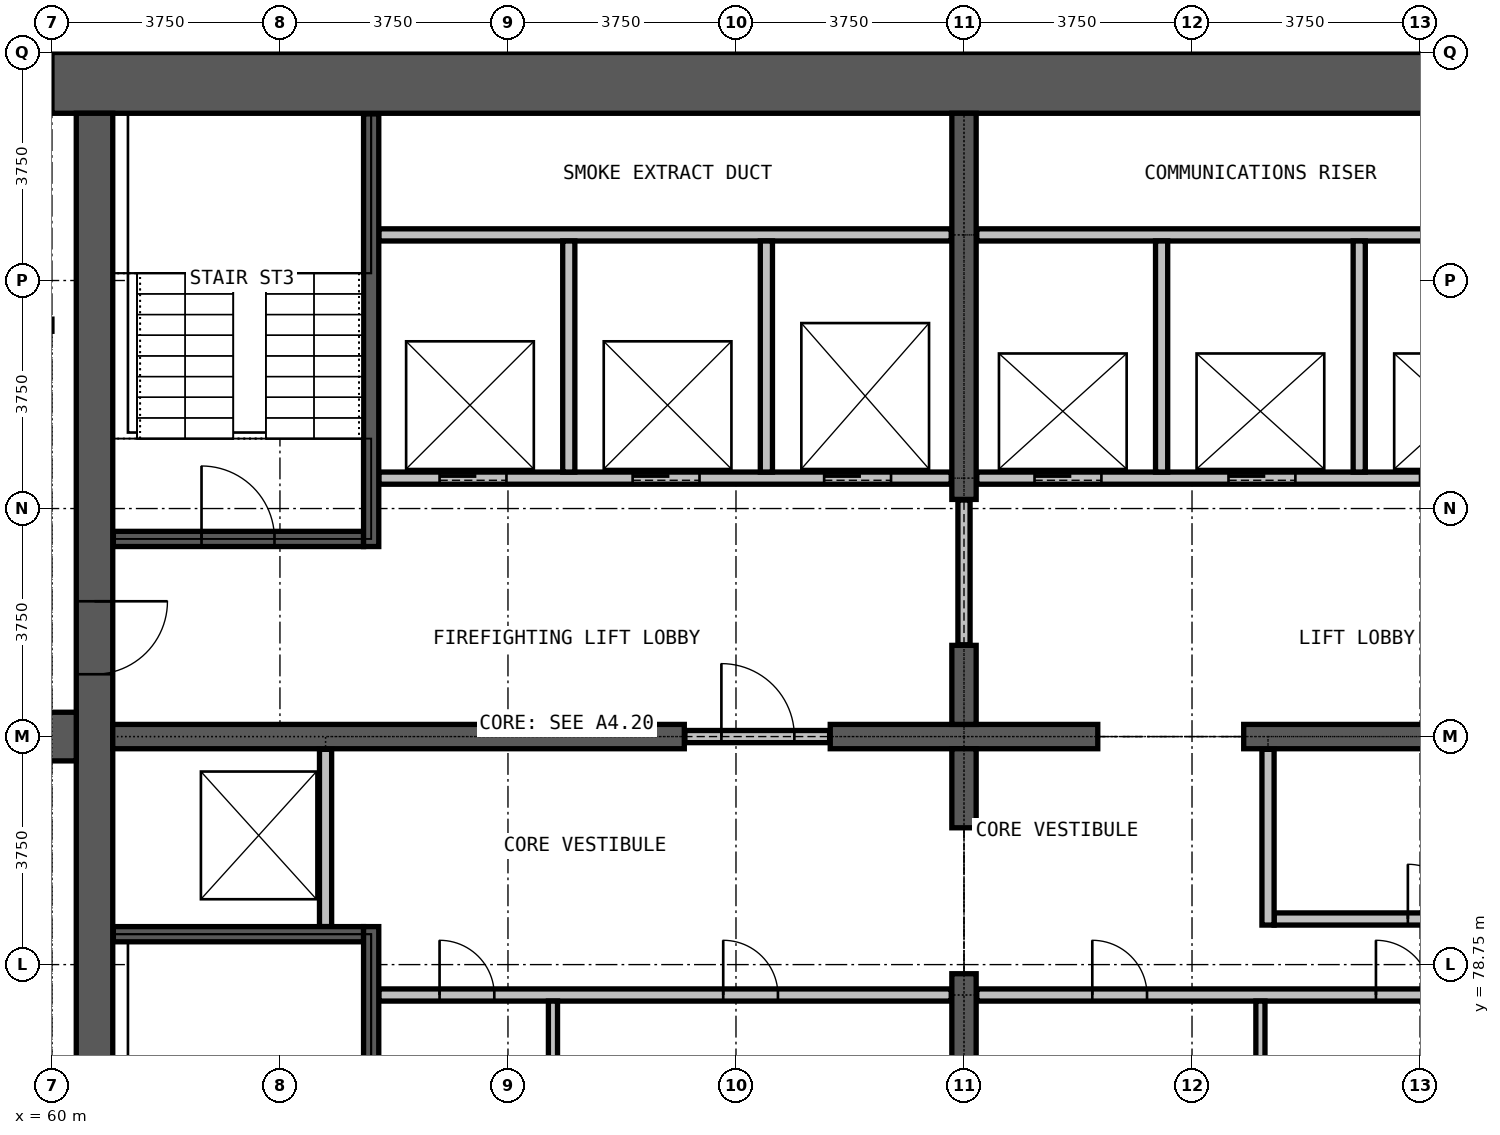
"""IFC4 building model, lengths in metres.
Left out: names, types, materials, properties, quantities, classifications, styles, units other than length and angle.
Written with IfcOpenShell. Run it as: python <this file> out.ifc"""

import sys

from ifc_helpers import new_model, si_unit, direction, frame, frame_2d, origin, place, context, subcontext, project, spatial, rectangle, extrude, element, fill, save


model = new_model("IFC4")
c1 = context("Model", 3, precision=1e-05, world=origin(), true_north=direction((0.0, 1.0)))
c2 = subcontext(c1, "Body", "Model", "MODEL_VIEW")
j1 = project(units=[si_unit("LENGTHUNIT", "METRE"), si_unit("PLANEANGLEUNIT", "RADIAN")], contexts=[c1])
p1 = place(None, origin())
s1 = spatial("IfcSite", under=j1, at=p1, CompositionType="ELEMENT")
p2 = place(p1, origin())
s2 = spatial("IfcBuilding", under=s1, at=p2, CompositionType="ELEMENT")
p3 = place(p2, frame((0.0, 0.0, 183.7)))
s3 = spatial("IfcBuildingStorey", under=s2, at=p3, CompositionType="ELEMENT", Elevation=183.7)
p4 = place(p3, frame((90.0, 93.25, 0.0), z_axis=(0.0, 0.0, 1.0), x_axis=(-1.0, 0.0, 0.0)))
e1 = element("IfcWall", 1, at=p4, inside=s3, PredefinedType="SHEAR", context=c2, shape_type="SweptSolid", body=[
    extrude(rectangle(XDim=30.0, YDim=1.0, at=frame_2d((15.0, 0.0))), origin(), (0.0, 0.0, 1.0), 5.0),
])
p5 = place(p3, frame((60.7, 92.75, 0.0), z_axis=(0.0, 0.0, 1.0), x_axis=(0.0, -1.0, 0.0)))
e2 = element("IfcWall", 2, at=p5, inside=s3, PredefinedType="SHEAR", context=c2, shape_type="SweptSolid", body=[
    extrude(rectangle(XDim=20.5, YDim=0.6, at=frame_2d((10.25, 0.0))), origin(), (0.0, 0.0, 1.0), 5.0),
])
p6 = place(p5, frame((19.025, 0.0, 0.0)))
e3 = element("IfcOpeningElement", 3, at=p6, cuts=e2, PredefinedType="OPENING", context=c2, shape_type="SweptSolid", body=[
    extrude(rectangle(XDim=1.2, YDim=2.2, at=frame_2d((0.6, 1.1))), frame((0.0, 0.31, 0.0), z_axis=(0.0, -1.0, 0.0), x_axis=(1.0, 0.0, 0.0)), (0.0, 0.0, 1.0), 0.62),
])
p7 = place(p5, frame((8.025, 0.0, 0.0)))
e4 = element("IfcOpeningElement", 4, at=p7, cuts=e2, PredefinedType="OPENING", context=c2, shape_type="SweptSolid", body=[
    extrude(rectangle(XDim=1.2, YDim=2.2, at=frame_2d((0.6, 1.1))), frame((0.0, 0.31, 0.0), z_axis=(0.0, -1.0, 0.0), x_axis=(1.0, 0.0, 0.0)), (0.0, 0.0, 1.0), 0.62),
])
p8 = place(p3, frame((61.0, 82.5, 0.0), z_axis=(0.0, 0.0, 1.0), x_axis=(1.0, 0.0, 0.0)))
e5 = element("IfcWall", 5, at=p8, inside=s3, PredefinedType="SHEAR", context=c2, shape_type="SweptSolid", body=[
    extrude(rectangle(XDim=9.4, YDim=0.4, at=frame_2d((4.7, 0.0))), origin(), (0.0, 0.0, 1.0), 5.0),
])
p9 = place(p3, frame((72.8, 82.5, 0.0), z_axis=(0.0, 0.0, 1.0), x_axis=(1.0, 0.0, 0.0)))
e6 = element("IfcWall", 6, at=p9, inside=s3, PredefinedType="SHEAR", context=c2, shape_type="SweptSolid", body=[
    extrude(rectangle(XDim=4.4, YDim=0.4, at=frame_2d((2.2, 0.0))), origin(), (0.0, 0.0, 1.0), 5.0),
])
p10 = place(p3, frame((79.6, 82.5, 0.0), z_axis=(0.0, 0.0, 1.0), x_axis=(1.0, 0.0, 0.0)))
e7 = element("IfcWall", 7, at=p10, inside=s3, PredefinedType="SHEAR", context=c2, shape_type="SweptSolid", body=[
    extrude(rectangle(XDim=9.4, YDim=0.4, at=frame_2d((4.7, 0.0))), origin(), (0.0, 0.0, 1.0), 5.0),
])
p11 = place(p3, frame((75.0, 72.25, 0.0), z_axis=(0.0, 0.0, 1.0), x_axis=(0.0, 1.0, 0.0)))
e8 = element("IfcWall", 8, at=p11, inside=s3, PredefinedType="SHEAR", context=c2, shape_type="SweptSolid", body=[
    extrude(rectangle(XDim=6.35, YDim=0.4, at=frame_2d((3.175, 0.0))), origin(), (0.0, 0.0, 1.0), 5.0),
])
for number, where, z_axis, x_axis in (
    (9, (75.0, 81.0, 0.0), (0.0, 0.0, 1.0), (0.0, 1.0, 0.0)),
    (10, (75.0, 82.7, 0.0), (0.0, 0.0, 1.0), (0.0, 1.0, 0.0)),
):
    element("IfcWall", number, at=place(p3, frame(where, z_axis=z_axis, x_axis=x_axis)), inside=s3, PredefinedType="SHEAR", context=c2, shape_type="SweptSolid", body=[
        extrude(rectangle(XDim=1.3, YDim=0.4, at=frame_2d((0.65, 0.0))), origin(), (0.0, 0.0, 1.0), 5.0),
    ])
p12 = place(p3, frame((75.0, 86.4, 0.0), z_axis=(0.0, 0.0, 1.0), x_axis=(0.0, 1.0, 0.0)))
e11 = element("IfcWall", 11, at=p12, inside=s3, PredefinedType="SHEAR", context=c2, shape_type="SweptSolid", body=[
    extrude(rectangle(XDim=6.35, YDim=0.4, at=frame_2d((3.175, 0.0))), origin(), (0.0, 0.0, 1.0), 5.0),
])
p13 = place(p3, frame((57.9, 82.5, 0.0), z_axis=(0.0, 0.0, 1.0), x_axis=(1.0, 0.0, 0.0)))
e12 = element("IfcWall", 12, at=p13, inside=s3, PredefinedType="SHEAR", context=c2, shape_type="SweptSolid", body=[
    extrude(rectangle(XDim=2.5, YDim=0.8, at=frame_2d((1.25, 0.0))), origin(), (0.0, 0.0, 1.0), 4.7),
])
p14 = place(p3, frame((65.375, 78.25, 0.0), z_axis=(0.0, 0.0, 1.0), x_axis=(1.0, 0.0, 0.0)))
e13 = element("IfcWall", 13, at=p14, inside=s3, PredefinedType="PARTITIONING", context=c2, shape_type="SweptSolid", body=[
    extrude(rectangle(XDim=9.415, YDim=0.2, at=frame_2d((4.708, 0.0))), origin(), (0.0, 0.0, 1.0), 4.7),
])
p15 = place(p14, frame((1.0, 0.0, 0.0)))
e14 = element("IfcOpeningElement", 14, at=p15, cuts=e13, PredefinedType="OPENING", context=c2, shape_type="SweptSolid", body=[
    extrude(rectangle(XDim=0.9, YDim=2.2, at=frame_2d((0.45, 1.1))), frame((0.0, 0.11, 0.0), z_axis=(0.0, -1.0, 0.0), x_axis=(1.0, 0.0, 0.0)), (0.0, 0.0, 1.0), 0.22),
])
p16 = place(p14, frame((5.665, 0.0, 0.0)))
e15 = element("IfcOpeningElement", 15, at=p16, cuts=e13, PredefinedType="OPENING", context=c2, shape_type="SweptSolid", body=[
    extrude(rectangle(XDim=0.9, YDim=2.2, at=frame_2d((0.45, 1.1))), frame((0.0, 0.11, 0.0), z_axis=(0.0, -1.0, 0.0), x_axis=(1.0, 0.0, 0.0)), (0.0, 0.0, 1.0), 0.22),
])
p17 = place(p3, frame((75.21, 78.25, 0.0), z_axis=(0.0, 0.0, 1.0), x_axis=(1.0, 0.0, 0.0)))
e16 = element("IfcWall", 16, at=p17, inside=s3, PredefinedType="PARTITIONING", context=c2, shape_type="SweptSolid", body=[
    extrude(rectangle(XDim=9.415, YDim=0.2, at=frame_2d((4.708, 0.0))), origin(), (0.0, 0.0, 1.0), 4.7),
])
p18 = place(p17, frame((1.9, 0.0, 0.0)))
e17 = element("IfcOpeningElement", 17, at=p18, cuts=e16, PredefinedType="OPENING", context=c2, shape_type="SweptSolid", body=[
    extrude(rectangle(XDim=0.9, YDim=2.2, at=frame_2d((0.45, 1.1))), frame((0.0, 0.11, 0.0), z_axis=(0.0, -1.0, 0.0), x_axis=(1.0, 0.0, 0.0)), (0.0, 0.0, 1.0), 0.22),
])
p19 = place(p17, frame((6.565, 0.0, 0.0)))
e18 = element("IfcOpeningElement", 18, at=p19, cuts=e16, PredefinedType="OPENING", context=c2, shape_type="SweptSolid", body=[
    extrude(rectangle(XDim=0.9, YDim=2.2, at=frame_2d((0.45, 1.1))), frame((0.0, 0.11, 0.0), z_axis=(0.0, -1.0, 0.0), x_axis=(1.0, 0.0, 0.0)), (0.0, 0.0, 1.0), 0.22),
])
p20 = place(p3, frame((80.1, 79.5, 0.0), z_axis=(0.0, 0.0, 1.0), x_axis=(1.0, 0.0, 0.0)))
e19 = element("IfcWall", 19, at=p20, inside=s3, PredefinedType="PARTITIONING", context=c2, shape_type="SweptSolid", body=[
    extrude(rectangle(XDim=5.3, YDim=0.2, at=frame_2d((2.65, 0.0))), origin(), (0.0, 0.0, 1.0), 4.7),
])
p21 = place(p20, frame((2.2, 0.0, 0.0)))
e20 = element("IfcOpeningElement", 20, at=p21, cuts=e19, PredefinedType="OPENING", context=c2, shape_type="SweptSolid", body=[
    extrude(rectangle(XDim=0.9, YDim=2.2, at=frame_2d((0.45, 1.1))), frame((0.0, 0.11, 0.0), z_axis=(0.0, -1.0, 0.0), x_axis=(1.0, 0.0, 0.0)), (0.0, 0.0, 1.0), 0.22),
])
p22 = place(p3, frame((70.41, 82.5, 0.0), z_axis=(0.0, 0.0, 1.0), x_axis=(1.0, 0.0, 0.0)))
e21 = element("IfcWall", 21, at=p22, inside=s3, PredefinedType="PARTITIONING", context=c2, shape_type="SweptSolid", body=[
    extrude(rectangle(XDim=2.38, YDim=0.2, at=frame_2d((1.19, 0.0))), origin(), (0.0, 0.0, 1.0), 2.4),
])
p23 = place(p22, frame((0.6, 0.0, 0.0)))
e22 = element("IfcOpeningElement", 22, at=p23, cuts=e21, PredefinedType="OPENING", context=c2, shape_type="SweptSolid", body=[
    extrude(rectangle(XDim=1.2, YDim=2.2, at=frame_2d((0.6, 1.1))), frame((0.0, 0.11, 0.0), z_axis=(0.0, -1.0, 0.0), x_axis=(1.0, 0.0, 0.0)), (0.0, 0.0, 1.0), 0.22),
])
p24 = place(p3, frame((75.0, 84.01, 0.0), z_axis=(0.0, 0.0, 1.0), x_axis=(0.0, 1.0, 0.0)))
e23 = element("IfcWall", 23, at=p24, inside=s3, PredefinedType="PARTITIONING", context=c2, shape_type="SweptSolid", body=[
    extrude(rectangle(XDim=2.38, YDim=0.2, at=frame_2d((1.19, 0.0))), origin(), (0.0, 0.0, 1.0), 2.4),
])
p25 = place(p3, frame((80.0, 79.4, 0.0), z_axis=(0.0, 0.0, 1.0), x_axis=(0.0, 1.0, 0.0)))
e24 = element("IfcWall", 24, at=p25, inside=s3, PredefinedType="PARTITIONING", context=c2, shape_type="SweptSolid", body=[
    extrude(rectangle(XDim=2.89, YDim=0.2, at=frame_2d((1.445, 0.0))), origin(), (0.0, 0.0, 1.0), 4.7),
])
for number, where, z_axis, x_axis in (
    (25, (68.24, 74.35, 0.0), (0.0, 0.0, 1.0), (0.0, 1.0, 0.0)),
    (26, (79.875, 74.35, 0.0), (0.0, 0.0, 1.0), (0.0, 1.0, 0.0)),
):
    element("IfcWall", number, at=place(p3, frame(where, z_axis=z_axis, x_axis=x_axis)), inside=s3, PredefinedType="PARTITIONING", context=c2, shape_type="SweptSolid", body=[
        extrude(rectangle(XDim=3.8, YDim=0.15, at=frame_2d((1.9, 0.0))), origin(), (0.0, 0.0, 1.0), 4.7),
    ])
p26 = place(p3, frame((65.375, 86.75, 0.0), z_axis=(0.0, 0.0, 1.0), x_axis=(1.0, 0.0, 0.0)))
e27 = element("IfcWall", 27, at=p26, inside=s3, PredefinedType="PARTITIONING", context=c2, shape_type="SweptSolid", body=[
    extrude(rectangle(XDim=9.415, YDim=0.2, at=frame_2d((4.708, 0.0))), origin(), (0.0, 0.0, 1.0), 4.7),
])
p27 = place(p26, frame((1.0, 0.0, 0.0)))
e28 = element("IfcOpeningElement", 28, at=p27, cuts=e27, PredefinedType="OPENING", context=c2, shape_type="SweptSolid", body=[
    extrude(rectangle(XDim=1.1, YDim=2.2, at=frame_2d((0.55, 1.1))), frame((0.0, 0.11, 0.0), z_axis=(0.0, -1.0, 0.0), x_axis=(1.0, 0.0, 0.0)), (0.0, 0.0, 1.0), 0.22),
])
p28 = place(p26, frame((4.175, 0.0, 0.0)))
e29 = element("IfcOpeningElement", 29, at=p28, cuts=e27, PredefinedType="OPENING", context=c2, shape_type="SweptSolid", body=[
    extrude(rectangle(XDim=1.1, YDim=2.2, at=frame_2d((0.55, 1.1))), frame((0.0, 0.11, 0.0), z_axis=(0.0, -1.0, 0.0), x_axis=(1.0, 0.0, 0.0)), (0.0, 0.0, 1.0), 0.22),
])
p29 = place(p26, frame((7.325, 0.0, 0.0)))
e30 = element("IfcOpeningElement", 30, at=p29, cuts=e27, PredefinedType="OPENING", context=c2, shape_type="SweptSolid", body=[
    extrude(rectangle(XDim=1.1, YDim=2.2, at=frame_2d((0.55, 1.1))), frame((0.0, 0.11, 0.0), z_axis=(0.0, -1.0, 0.0), x_axis=(1.0, 0.0, 0.0)), (0.0, 0.0, 1.0), 0.22),
])
p30 = place(p3, frame((75.21, 86.75, 0.0), z_axis=(0.0, 0.0, 1.0), x_axis=(1.0, 0.0, 0.0)))
e31 = element("IfcWall", 31, at=p30, inside=s3, PredefinedType="PARTITIONING", context=c2, shape_type="SweptSolid", body=[
    extrude(rectangle(XDim=9.415, YDim=0.2, at=frame_2d((4.708, 0.0))), origin(), (0.0, 0.0, 1.0), 4.7),
])
p31 = place(p30, frame((0.95, 0.0, 0.0)))
e32 = element("IfcOpeningElement", 32, at=p31, cuts=e31, PredefinedType="OPENING", context=c2, shape_type="SweptSolid", body=[
    extrude(rectangle(XDim=1.1, YDim=2.2, at=frame_2d((0.55, 1.1))), frame((0.0, 0.11, 0.0), z_axis=(0.0, -1.0, 0.0), x_axis=(1.0, 0.0, 0.0)), (0.0, 0.0, 1.0), 0.22),
])
p32 = place(p30, frame((4.14, 0.0, 0.0)))
e33 = element("IfcOpeningElement", 33, at=p32, cuts=e31, PredefinedType="OPENING", context=c2, shape_type="SweptSolid", body=[
    extrude(rectangle(XDim=1.1, YDim=2.2, at=frame_2d((0.55, 1.1))), frame((0.0, 0.11, 0.0), z_axis=(0.0, -1.0, 0.0), x_axis=(1.0, 0.0, 0.0)), (0.0, 0.0, 1.0), 0.22),
])
p33 = place(p30, frame((7.29, 0.0, 0.0)))
e34 = element("IfcOpeningElement", 34, at=p33, cuts=e31, PredefinedType="OPENING", context=c2, shape_type="SweptSolid", body=[
    extrude(rectangle(XDim=1.1, YDim=2.2, at=frame_2d((0.55, 1.1))), frame((0.0, 0.11, 0.0), z_axis=(0.0, -1.0, 0.0), x_axis=(1.0, 0.0, 0.0)), (0.0, 0.0, 1.0), 0.22),
])
for number, where, z_axis, x_axis in (
    (35, (65.375, 90.75, 0.0), (0.0, 0.0, 1.0), (1.0, 0.0, 0.0)),
    (36, (75.21, 90.75, 0.0), (0.0, 0.0, 1.0), (1.0, 0.0, 0.0)),
):
    element("IfcWall", number, at=place(p3, frame(where, z_axis=z_axis, x_axis=x_axis)), inside=s3, PredefinedType="PARTITIONING", context=c2, shape_type="SweptSolid", body=[
        extrude(rectangle(XDim=9.415, YDim=0.2, at=frame_2d((4.708, 0.0))), origin(), (0.0, 0.0, 1.0), 4.7),
    ])
p34 = place(p3, frame((64.5, 79.375, 0.0), z_axis=(0.0, 0.0, 1.0), x_axis=(0.0, 1.0, 0.0)))
e37 = element("IfcWall", 37, at=p34, inside=s3, PredefinedType="PARTITIONING", context=c2, shape_type="SweptSolid", body=[
    extrude(rectangle(XDim=2.915, YDim=0.2, at=frame_2d((1.458, 0.0))), origin(), (0.0, 0.0, 1.0), 4.7),
])
for number, where, z_axis, x_axis in (
    (38, (68.5, 86.85, 0.0), (0.0, 0.0, 1.0), (0.0, 1.0, 0.0)),
    (39, (71.75, 86.85, 0.0), (0.0, 0.0, 1.0), (0.0, 1.0, 0.0)),
    (40, (78.25, 86.85, 0.0), (0.0, 0.0, 1.0), (0.0, 1.0, 0.0)),
    (41, (81.5, 86.85, 0.0), (0.0, 0.0, 1.0), (0.0, 1.0, 0.0)),
):
    element("IfcWall", number, at=place(p3, frame(where, z_axis=z_axis, x_axis=x_axis)), inside=s3, PredefinedType="PARTITIONING", context=c2, shape_type="SweptSolid", body=[
        extrude(rectangle(XDim=3.8, YDim=0.2, at=frame_2d((1.9, 0.0))), origin(), (0.0, 0.0, 1.0), 4.7),
    ])
p35 = place(p3, frame((61.01, 79.25, 0.0), z_axis=(0.0, 0.0, 1.0), x_axis=(1.0, 0.0, 0.0)))
e42 = element("IfcWall", 42, at=p35, inside=s3, PredefinedType="PARTITIONING", context=c2, shape_type="SweptSolid", body=[
    extrude(rectangle(XDim=4.115, YDim=0.25, at=frame_2d((2.058, 0.0))), origin(), (0.0, 0.0, 1.0), 4.7),
])
p36 = place(p3, frame((61.01, 85.75, 0.0), z_axis=(0.0, 0.0, 1.0), x_axis=(1.0, 0.0, 0.0)))
e43 = element("IfcWall", 43, at=p36, inside=s3, PredefinedType="PARTITIONING", context=c2, shape_type="SweptSolid", body=[
    extrude(rectangle(XDim=4.115, YDim=0.25, at=frame_2d((2.058, 0.0))), origin(), (0.0, 0.0, 1.0), 4.7),
])
p37 = place(p36, frame((1.45, 0.0, 0.0)))
e44 = element("IfcOpeningElement", 44, at=p37, cuts=e43, PredefinedType="OPENING", context=c2, shape_type="SweptSolid", body=[
    extrude(rectangle(XDim=1.2, YDim=2.2, at=frame_2d((0.6, 1.1))), frame((0.0, 0.135, 0.0), z_axis=(0.0, -1.0, 0.0), x_axis=(1.0, 0.0, 0.0)), (0.0, 0.0, 1.0), 0.27),
])
for number, where, z_axis, x_axis in (
    (45, (65.25, 72.26, 0.0), (0.0, 0.0, 1.0), (0.0, 1.0, 0.0)),
    (46, (65.25, 85.625, 0.0), (0.0, 0.0, 1.0), (0.0, 1.0, 0.0)),
):
    element("IfcWall", number, at=place(p3, frame(where, z_axis=z_axis, x_axis=x_axis)), inside=s3, PredefinedType="PARTITIONING", context=c2, shape_type="SweptSolid", body=[
        extrude(rectangle(XDim=7.115, YDim=0.25, at=frame_2d((3.558, 0.0))), origin(), (0.0, 0.0, 1.0), 4.7),
    ])
p38 = place(p31, origin())
e47 = element("IfcDoor", 47, at=p38, inside=s3, OperationType="DOUBLE_DOOR_SLIDING", PredefinedType="DOOR", context=c2, shape_type="SweptSolid", body=[
    extrude(rectangle(XDim=1.1, YDim=2.2, at=frame_2d((0.55, 1.1))), frame((0.0, 0.025, 0.0), z_axis=(0.0, -1.0, 0.0), x_axis=(1.0, 0.0, 0.0)), (0.0, 0.0, 1.0), 0.05),
])
fill(e32, e47)
p39 = place(p32, origin())
e48 = element("IfcDoor", 48, at=p39, inside=s3, OperationType="DOUBLE_DOOR_SLIDING", PredefinedType="DOOR", context=c2, shape_type="SweptSolid", body=[
    extrude(rectangle(XDim=1.1, YDim=2.2, at=frame_2d((0.55, 1.1))), frame((0.0, 0.025, 0.0), z_axis=(0.0, -1.0, 0.0), x_axis=(1.0, 0.0, 0.0)), (0.0, 0.0, 1.0), 0.05),
])
fill(e33, e48)
p40 = place(p27, origin())
e49 = element("IfcDoor", 49, at=p40, inside=s3, OperationType="DOUBLE_DOOR_SLIDING", PredefinedType="DOOR", context=c2, shape_type="SweptSolid", body=[
    extrude(rectangle(XDim=1.1, YDim=2.2, at=frame_2d((0.55, 1.1))), frame((0.0, 0.025, 0.0), z_axis=(0.0, -1.0, 0.0), x_axis=(1.0, 0.0, 0.0)), (0.0, 0.0, 1.0), 0.05),
])
fill(e28, e49)
p41 = place(p28, origin())
e50 = element("IfcDoor", 50, at=p41, inside=s3, OperationType="DOUBLE_DOOR_SLIDING", PredefinedType="DOOR", context=c2, shape_type="SweptSolid", body=[
    extrude(rectangle(XDim=1.1, YDim=2.2, at=frame_2d((0.55, 1.1))), frame((0.0, 0.025, 0.0), z_axis=(0.0, -1.0, 0.0), x_axis=(1.0, 0.0, 0.0)), (0.0, 0.0, 1.0), 0.05),
])
fill(e29, e50)
p42 = place(p29, origin())
e51 = element("IfcDoor", 51, at=p42, inside=s3, OperationType="DOUBLE_DOOR_SLIDING", PredefinedType="DOOR", context=c2, shape_type="SweptSolid", body=[
    extrude(rectangle(XDim=1.1, YDim=2.2, at=frame_2d((0.55, 1.1))), frame((0.0, 0.025, 0.0), z_axis=(0.0, -1.0, 0.0), x_axis=(1.0, 0.0, 0.0)), (0.0, 0.0, 1.0), 0.05),
])
fill(e30, e51)
p43 = place(p23, origin())
e52 = element("IfcDoor", 52, at=p43, inside=s3, OperationType="SINGLE_SWING_LEFT", PredefinedType="DOOR", context=c2, shape_type="SweptSolid", body=[
    extrude(rectangle(XDim=1.2, YDim=2.2, at=frame_2d((0.6, 1.1))), frame((0.0, 0.025, 0.0), z_axis=(0.0, -1.0, 0.0), x_axis=(1.0, 0.0, 0.0)), (0.0, 0.0, 1.0), 0.05),
])
fill(e22, e52)
p44 = place(p37, origin())
e53 = element("IfcDoor", 53, at=p44, inside=s3, OperationType="SINGLE_SWING_RIGHT", PredefinedType="DOOR", context=c2, shape_type="SweptSolid", body=[
    extrude(rectangle(XDim=1.2, YDim=2.2, at=frame_2d((0.6, 1.1))), frame((0.0, 0.025, 0.0), z_axis=(0.0, -1.0, 0.0), x_axis=(1.0, 0.0, 0.0)), (0.0, 0.0, 1.0), 0.05),
])
fill(e44, e53)
p45 = place(p21, origin())
e54 = element("IfcDoor", 54, at=p45, inside=s3, OperationType="SINGLE_SWING_LEFT", PredefinedType="DOOR", context=c2, shape_type="SweptSolid", body=[
    extrude(rectangle(XDim=0.9, YDim=2.2, at=frame_2d((0.45, 1.1))), frame((0.0, 0.025, 0.0), z_axis=(0.0, -1.0, 0.0), x_axis=(1.0, 0.0, 0.0)), (0.0, 0.0, 1.0), 0.05),
])
fill(e20, e54)
p46 = place(p7, origin())
e55 = element("IfcDoor", 55, at=p46, inside=s3, OperationType="SINGLE_SWING_LEFT", PredefinedType="DOOR", context=c2, shape_type="SweptSolid", body=[
    extrude(rectangle(XDim=1.2, YDim=2.2, at=frame_2d((0.6, 1.1))), frame((0.0, 0.025, 0.0), z_axis=(0.0, -1.0, 0.0), x_axis=(1.0, 0.0, 0.0)), (0.0, 0.0, 1.0), 0.05),
])
fill(e4, e55)
p47 = place(p15, origin())
e56 = element("IfcDoor", 56, at=p47, inside=s3, OperationType="SINGLE_SWING_LEFT", PredefinedType="DOOR", context=c2, shape_type="SweptSolid", body=[
    extrude(rectangle(XDim=0.9, YDim=2.2, at=frame_2d((0.45, 1.1))), frame((0.0, 0.025, 0.0), z_axis=(0.0, -1.0, 0.0), x_axis=(1.0, 0.0, 0.0)), (0.0, 0.0, 1.0), 0.05),
])
fill(e14, e56)
p48 = place(p16, origin())
e57 = element("IfcDoor", 57, at=p48, inside=s3, OperationType="SINGLE_SWING_LEFT", PredefinedType="DOOR", context=c2, shape_type="SweptSolid", body=[
    extrude(rectangle(XDim=0.9, YDim=2.2, at=frame_2d((0.45, 1.1))), frame((0.0, 0.025, 0.0), z_axis=(0.0, -1.0, 0.0), x_axis=(1.0, 0.0, 0.0)), (0.0, 0.0, 1.0), 0.05),
])
fill(e15, e57)
p49 = place(p18, origin())
e58 = element("IfcDoor", 58, at=p49, inside=s3, OperationType="SINGLE_SWING_LEFT", PredefinedType="DOOR", context=c2, shape_type="SweptSolid", body=[
    extrude(rectangle(XDim=0.9, YDim=2.2, at=frame_2d((0.45, 1.1))), frame((0.0, 0.025, 0.0), z_axis=(0.0, -1.0, 0.0), x_axis=(1.0, 0.0, 0.0)), (0.0, 0.0, 1.0), 0.05),
])
fill(e17, e58)
p50 = place(p19, origin())
e59 = element("IfcDoor", 59, at=p50, inside=s3, OperationType="SINGLE_SWING_LEFT", PredefinedType="DOOR", context=c2, shape_type="SweptSolid", body=[
    extrude(rectangle(XDim=0.9, YDim=2.2, at=frame_2d((0.45, 1.1))), frame((0.0, 0.025, 0.0), z_axis=(0.0, -1.0, 0.0), x_axis=(1.0, 0.0, 0.0)), (0.0, 0.0, 1.0), 0.05),
])
fill(e18, e59)
save(model, sys.argv[1])
